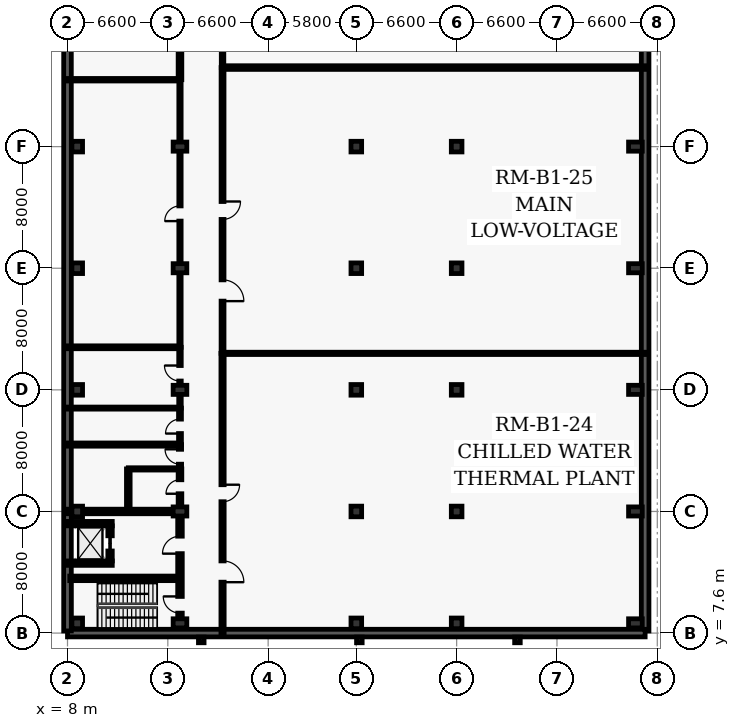
"""IFC4 building model, lengths in metres.
Left out: names, types, materials, properties, quantities, classifications, styles, units other than length and angle.
Written with IfcOpenShell. Run it as: python <this file> out.ifc"""

import sys

from ifc_helpers import new_model, si_unit, direction, frame, frame_2d, origin, origin_2d, place, context, subcontext, project, spatial, rectangle, i_section, extrude, element, fill, save


model = new_model("IFC4")
c1 = context("Model", 3, precision=1e-05, world=origin(), true_north=direction((0.0, 1.0)))
c2 = subcontext(c1, "Body", "Model", "MODEL_VIEW")
j1 = project(units=[si_unit("LENGTHUNIT", "METRE"), si_unit("PLANEANGLEUNIT", "RADIAN")], contexts=[c1])
p1 = place(None, origin())
s1 = spatial("IfcSite", under=j1, at=p1, CompositionType="ELEMENT")
p2 = place(p1, origin())
s2 = spatial("IfcBuilding", under=s1, at=p2, CompositionType="ELEMENT")
p3 = place(p2, frame((0.0, 0.0, -4.8)))
s3 = spatial("IfcBuildingStorey", under=s2, at=p3, CompositionType="ELEMENT", Elevation=-4.8)
for number, where, z_axis, x_axis in (
    (1, (8.64, 8.24, 0.0), (0.0, 0.0, 1.0), (1.0, 0.0, 0.0)),
    (2, (8.64, 15.6, 0.0), (0.0, 0.0, 1.0), (1.0, 0.0, 0.0)),
    (3, (8.64, 23.6, 0.0), (0.0, 0.0, 1.0), (1.0, 0.0, 0.0)),
    (4, (8.64, 31.6, 0.0), (0.0, 0.0, 1.0), (1.0, 0.0, 0.0)),
    (5, (8.64, 39.6, 0.0), (0.0, 0.0, 1.0), (1.0, 0.0, 0.0)),
):
    element("IfcColumn", number, at=place(p3, frame(where, z_axis=z_axis, x_axis=x_axis)), inside=s3, PredefinedType="COLUMN", context=c2, shape_type="SweptSolid", body=[
        extrude(rectangle(XDim=0.7, YDim=0.7, at=origin_2d()), origin(), (0.0, 0.0, 1.0), 4.8),
    ])
for number, where, z_axis, x_axis in (
    (6, (15.4, 8.24, 0.0), (0.0, 0.0, 1.0), (1.0, 0.0, 0.0)),
    (7, (15.4, 15.6, 0.0), (0.0, 0.0, 1.0), (1.0, 0.0, 0.0)),
    (8, (15.4, 23.6, 0.0), (0.0, 0.0, 1.0), (1.0, 0.0, 0.0)),
    (9, (15.4, 31.6, 0.0), (0.0, 0.0, 1.0), (1.0, 0.0, 0.0)),
    (10, (15.4, 39.6, 0.0), (0.0, 0.0, 1.0), (1.0, 0.0, 0.0)),
):
    element("IfcColumn", number, at=place(p3, frame(where, z_axis=z_axis, x_axis=x_axis)), inside=s3, PredefinedType="COLUMN", context=c2, shape_type="SweptSolid", body=[
        extrude(rectangle(XDim=0.6, YDim=0.9, at=origin_2d()), origin(), (0.0, 0.0, 1.0), 4.8),
    ])
for number, where, z_axis, x_axis in (
    (11, (27.0, 8.24, 0.0), (0.0, 0.0, 1.0), (1.0, 0.0, 0.0)),
    (12, (27.0, 15.6, 0.0), (0.0, 0.0, 1.0), (1.0, 0.0, 0.0)),
    (13, (27.0, 23.6, 0.0), (0.0, 0.0, 1.0), (1.0, 0.0, 0.0)),
    (14, (27.0, 31.6, 0.0), (0.0, 0.0, 1.0), (1.0, 0.0, 0.0)),
    (15, (27.0, 39.6, 0.0), (0.0, 0.0, 1.0), (1.0, 0.0, 0.0)),
    (16, (33.6, 8.24, 0.0), (0.0, 0.0, 1.0), (1.0, 0.0, 0.0)),
    (17, (33.6, 15.6, 0.0), (0.0, 0.0, 1.0), (1.0, 0.0, 0.0)),
    (18, (33.6, 23.6, 0.0), (0.0, 0.0, 1.0), (1.0, 0.0, 0.0)),
    (19, (33.6, 31.6, 0.0), (0.0, 0.0, 1.0), (1.0, 0.0, 0.0)),
    (20, (33.6, 39.6, 0.0), (0.0, 0.0, 1.0), (1.0, 0.0, 0.0)),
):
    element("IfcColumn", number, at=place(p3, frame(where, z_axis=z_axis, x_axis=x_axis)), inside=s3, PredefinedType="COLUMN", context=c2, shape_type="SweptSolid", body=[
        extrude(rectangle(XDim=0.7, YDim=0.7, at=origin_2d()), origin(), (0.0, 0.0, 1.0), 4.8),
    ])
for number, where, z_axis, x_axis in (
    (21, (45.36, 8.24, 0.0), (0.0, 0.0, 1.0), (1.0, 0.0, 0.0)),
    (22, (45.36, 15.6, 0.0), (0.0, 0.0, 1.0), (1.0, 0.0, 0.0)),
    (23, (45.36, 23.6, 0.0), (0.0, 0.0, 1.0), (1.0, 0.0, 0.0)),
    (24, (45.36, 31.6, 0.0), (0.0, 0.0, 1.0), (1.0, 0.0, 0.0)),
    (25, (45.36, 39.6, 0.0), (0.0, 0.0, 1.0), (1.0, 0.0, 0.0)),
):
    element("IfcColumn", number, at=place(p3, frame(where, z_axis=z_axis, x_axis=x_axis)), inside=s3, PredefinedType="COLUMN", context=c2, shape_type="SweptSolid", body=[
        extrude(rectangle(XDim=0.6, YDim=0.9, at=origin_2d()), origin(), (0.0, 0.0, 1.0), 4.8),
    ])
for number, where, z_axis, x_axis in (
    (26, (16.8, 7.15, -0.45), (0.0, 0.0, 1.0), (1.0, 0.0, 0.0)),
    (27, (27.2, 7.15, -0.45), (0.0, 0.0, 1.0), (1.0, 0.0, 0.0)),
    (28, (37.6, 7.15, -0.45), (0.0, 0.0, 1.0), (1.0, 0.0, 0.0)),
):
    element("IfcColumn", number, at=place(p3, frame(where, z_axis=z_axis, x_axis=x_axis)), inside=s3, PredefinedType="COLUMN", context=c2, shape_type="SweptSolid", body=[
        extrude(i_section(OverallWidth=0.373, OverallDepth=0.368, WebThickness=0.014, FlangeThickness=0.024, at=origin_2d()), origin(), (0.0, 0.0, 1.0), 5.25),
    ])
p4 = place(p3, frame((46.0, 63.46, 0.0), z_axis=(0.0, 0.0, 1.0), x_axis=(0.0, -1.0, 0.0)))
e29 = element("IfcWall", 29, at=p4, inside=s3, PredefinedType="USERDEFINED", context=c2, shape_type="SweptSolid", body=[
    extrude(rectangle(XDim=55.72, YDim=0.5, at=frame_2d((27.86, 0.0))), origin(), (0.0, 0.0, 1.0), 4.5),
])
p5 = place(p3, frame((46.0, 7.6, 0.0), z_axis=(0.0, 0.0, 1.0), x_axis=(-1.0, 0.0, 0.0)))
e30 = element("IfcWall", 30, at=p5, inside=s3, PredefinedType="USERDEFINED", context=c2, shape_type="SweptSolid", body=[
    extrude(rectangle(XDim=38.0, YDim=0.5, at=frame_2d((19.0, 0.0))), origin(), (0.0, 0.0, 1.0), 4.5),
])
p6 = place(p3, frame((8.0, 7.74, 0.0), z_axis=(0.0, 0.0, 1.0), x_axis=(0.0, 1.0, 0.0)))
e31 = element("IfcWall", 31, at=p6, inside=s3, PredefinedType="USERDEFINED", context=c2, shape_type="SweptSolid", body=[
    extrude(rectangle(XDim=55.72, YDim=0.5, at=frame_2d((27.86, 0.0))), origin(), (0.0, 0.0, 1.0), 4.5),
])
p7 = place(p3, frame((7.85, 15.6, 0.0), z_axis=(0.0, 0.0, 1.0), x_axis=(1.0, 0.0, 0.0)))
e32 = element("IfcWall", 32, at=p7, inside=s3, PredefinedType="SHEAR", context=c2, shape_type="SweptSolid", body=[
    extrude(rectangle(XDim=7.248, YDim=0.3, at=frame_2d((3.624, 0.0))), origin(), (0.0, 0.0, 1.0), 4.5),
])
p8 = place(p3, frame((15.4, 8.692, 0.0), z_axis=(0.0, 0.0, 1.0), x_axis=(0.0, 1.0, 0.0)))
e33 = element("IfcWall", 33, at=p8, inside=s3, PredefinedType="SHEAR", context=c2, shape_type="SweptSolid", body=[
    extrude(rectangle(XDim=6.456, YDim=0.3, at=frame_2d((3.228, 0.0))), origin(), (0.0, 0.0, 1.0), 4.5),
])
p9 = place(p8, frame((0.22, 0.0, 0.0)))
e34 = element("IfcOpeningElement", 34, at=p9, cuts=e33, PredefinedType="OPENING", context=c2, shape_type="SweptSolid", body=[
    extrude(rectangle(XDim=1.1, YDim=2.15, at=frame_2d((0.55, 1.075))), frame((0.0, 0.16, 0.0), z_axis=(0.0, -1.0, 0.0), x_axis=(1.0, 0.0, 0.0)), (0.0, 0.0, 1.0), 0.32),
])
p10 = place(p8, frame((4.133, 0.0, 0.0)))
e35 = element("IfcOpeningElement", 35, at=p10, cuts=e33, PredefinedType="OPENING", context=c2, shape_type="SweptSolid", body=[
    extrude(rectangle(XDim=1.15, YDim=2.2, at=frame_2d((0.575, 1.1))), frame((0.0, 0.16, 0.0), z_axis=(0.0, -1.0, 0.0), x_axis=(1.0, 0.0, 0.0)), (0.0, 0.0, 1.0), 0.32),
])
p11 = place(p3, frame((8.15, 11.2, 0.0), z_axis=(0.0, 0.0, 1.0), x_axis=(1.0, 0.0, 0.0)))
e36 = element("IfcWall", 36, at=p11, inside=s3, PredefinedType="SHEAR", context=c2, shape_type="SweptSolid", body=[
    extrude(rectangle(XDim=7.1, YDim=0.3, at=frame_2d((3.55, 0.0))), origin(), (0.0, 0.0, 1.0), 4.5),
])
for number, where, z_axis, x_axis in (
    (37, (8.055, 12.2, 0.0), (0.0, 0.0, 1.0), (1.0, 0.0, 0.0)),
    (38, (8.055, 14.8, 0.0), (0.0, 0.0, 1.0), (1.0, 0.0, 0.0)),
):
    element("IfcWall", number, at=place(p3, frame(where, z_axis=z_axis, x_axis=x_axis)), inside=s3, PredefinedType="SHEAR", context=c2, shape_type="SweptSolid", body=[
        extrude(rectangle(XDim=2.89, YDim=0.29, at=frame_2d((1.445, 0.0))), origin(), (0.0, 0.0, 1.0), 4.5),
    ])
p12 = place(p3, frame((10.8, 12.345, 0.0), z_axis=(0.0, 0.0, 1.0), x_axis=(0.0, 1.0, 0.0)))
e39 = element("IfcWall", 39, at=p12, inside=s3, PredefinedType="SHEAR", context=c2, shape_type="SweptSolid", body=[
    extrude(rectangle(XDim=2.31, YDim=0.29, at=frame_2d((1.155, 0.0))), origin(), (0.0, 0.0, 1.0), 4.5),
])
p13 = place(p12, frame((0.655, 0.0, 0.0)))
e40 = element("IfcOpeningElement", 40, at=p13, cuts=e39, PredefinedType="OPENING", context=c2, shape_type="SweptSolid", body=[
    extrude(rectangle(XDim=1.0, YDim=2.15, at=frame_2d((0.5, 1.075))), frame((0.0, 0.155, 0.0), z_axis=(0.0, -1.0, 0.0), x_axis=(1.0, 0.0, 0.0)), (0.0, 0.0, 1.0), 0.31),
])
p14 = place(p3, frame((15.4, 16.052, 0.0), z_axis=(0.0, 0.0, 1.0), x_axis=(0.0, 1.0, 0.0)))
e41 = element("IfcWall", 41, at=p14, inside=s3, PredefinedType="PARTITIONING", context=c2, shape_type="SweptSolid", body=[
    extrude(rectangle(XDim=2.348, YDim=0.24, at=frame_2d((1.174, 0.0))), origin(), (0.0, 0.0, 1.0), 3.65),
])
p15 = place(p14, frame((0.714, 0.0, 0.0)))
e42 = element("IfcOpeningElement", 42, at=p15, cuts=e41, PredefinedType="OPENING", context=c2, shape_type="SweptSolid", body=[
    extrude(rectangle(XDim=0.92, YDim=2.1, at=frame_2d((0.46, 1.05))), frame((0.0, 0.13, 0.0), z_axis=(0.0, -1.0, 0.0), x_axis=(1.0, 0.0, 0.0)), (0.0, 0.0, 1.0), 0.26),
])
p16 = place(p3, frame((15.4, 18.4, 0.0), z_axis=(0.0, 0.0, 1.0), x_axis=(0.0, 1.0, 0.0)))
e43 = element("IfcWall", 43, at=p16, inside=s3, PredefinedType="PARTITIONING", context=c2, shape_type="SweptSolid", body=[
    extrude(rectangle(XDim=1.6, YDim=0.21, at=frame_2d((0.8, 0.0))), origin(), (0.0, 0.0, 1.0), 3.65),
])
p17 = place(p16, frame((0.31, 0.0, 0.0)))
e44 = element("IfcOpeningElement", 44, at=p17, cuts=e43, PredefinedType="OPENING", context=c2, shape_type="SweptSolid", body=[
    extrude(rectangle(XDim=0.98, YDim=2.1, at=frame_2d((0.49, 1.05))), frame((0.0, 0.115, 0.0), z_axis=(0.0, -1.0, 0.0), x_axis=(1.0, 0.0, 0.0)), (0.0, 0.0, 1.0), 0.23),
])
p18 = place(p3, frame((15.4, 20.0, 0.0), z_axis=(0.0, 0.0, 1.0), x_axis=(0.0, 1.0, 0.0)))
e45 = element("IfcWall", 45, at=p18, inside=s3, PredefinedType="PARTITIONING", context=c2, shape_type="SweptSolid", body=[
    extrude(rectangle(XDim=2.4, YDim=0.19, at=frame_2d((1.2, 0.0))), origin(), (0.0, 0.0, 1.0), 3.65),
])
p19 = place(p18, frame((0.725, 0.0, 0.0)))
e46 = element("IfcOpeningElement", 46, at=p19, cuts=e45, PredefinedType="OPENING", context=c2, shape_type="SweptSolid", body=[
    extrude(rectangle(XDim=0.95, YDim=2.1, at=frame_2d((0.475, 1.05))), frame((0.0, 0.105, 0.0), z_axis=(0.0, -1.0, 0.0), x_axis=(1.0, 0.0, 0.0)), (0.0, 0.0, 1.0), 0.21),
])
p20 = place(p3, frame((15.4, 22.4, 0.0), z_axis=(0.0, 0.0, 1.0), x_axis=(0.0, 1.0, 0.0)))
e47 = element("IfcWall", 47, at=p20, inside=s3, PredefinedType="PARTITIONING", context=c2, shape_type="SweptSolid", body=[
    extrude(rectangle(XDim=4.0, YDim=0.165, at=frame_2d((2.0, 0.0))), origin(), (0.0, 0.0, 1.0), 3.65),
])
p21 = place(p20, frame((1.78, 0.0, 0.0)))
e48 = element("IfcOpeningElement", 48, at=p21, cuts=e47, PredefinedType="OPENING", context=c2, shape_type="SweptSolid", body=[
    extrude(rectangle(XDim=1.02, YDim=2.1, at=frame_2d((0.51, 1.05))), frame((0.0, 0.093, 0.0), z_axis=(0.0, -1.0, 0.0), x_axis=(1.0, 0.0, 0.0)), (0.0, 0.0, 1.0), 0.185),
])
p22 = place(p3, frame((15.4, 26.4, 0.0), z_axis=(0.0, 0.0, 1.0), x_axis=(0.0, 1.0, 0.0)))
e49 = element("IfcWall", 49, at=p22, inside=s3, PredefinedType="PARTITIONING", context=c2, shape_type="SweptSolid", body=[
    extrude(rectangle(XDim=17.6, YDim=0.15, at=frame_2d((8.8, 0.0))), origin(), (0.0, 0.0, 1.0), 3.65),
])
p23 = place(p22, frame((8.3, 0.0, 0.0)))
e50 = element("IfcOpeningElement", 50, at=p23, cuts=e49, PredefinedType="OPENING", context=c2, shape_type="SweptSolid", body=[
    extrude(rectangle(XDim=1.0, YDim=2.1, at=frame_2d((0.5, 1.05))), frame((0.0, 0.085, 0.0), z_axis=(0.0, -1.0, 0.0), x_axis=(1.0, 0.0, 0.0)), (0.0, 0.0, 1.0), 0.17),
])
p24 = place(p3, frame((15.4, 44.0, 0.0), z_axis=(0.0, 0.0, 1.0), x_axis=(0.0, 1.0, 0.0)))
e51 = element("IfcWall", 51, at=p24, inside=s3, PredefinedType="PARTITIONING", context=c2, shape_type="SweptSolid", body=[
    extrude(rectangle(XDim=19.6, YDim=0.24, at=frame_2d((9.8, 0.0))), origin(), (0.0, 0.0, 1.0), 3.65),
])
p25 = place(p24, frame((9.26, 0.0, 0.0)))
e52 = element("IfcOpeningElement", 52, at=p25, cuts=e51, PredefinedType="OPENING", context=c2, shape_type="SweptSolid", body=[
    extrude(rectangle(XDim=1.08, YDim=2.15, at=frame_2d((0.54, 1.075))), frame((0.0, 0.13, 0.0), z_axis=(0.0, -1.0, 0.0), x_axis=(1.0, 0.0, 0.0)), (0.0, 0.0, 1.0), 0.26),
])
p26 = place(p3, frame((18.2, 26.0, 0.0), z_axis=(0.0, 0.0, 1.0), x_axis=(0.0, -1.0, 0.0)))
e53 = element("IfcWall", 53, at=p26, inside=s3, PredefinedType="PARTITIONING", context=c2, shape_type="SweptSolid", body=[
    extrude(rectangle(XDim=18.4, YDim=0.21, at=frame_2d((9.2, 0.0))), origin(), (0.0, 0.0, 1.0), 4.5),
])
p27 = place(p26, frame((8.64, 0.0, 0.0)))
e54 = element("IfcOpeningElement", 54, at=p27, cuts=e53, PredefinedType="OPENING", context=c2, shape_type="SweptSolid", body=[
    extrude(rectangle(XDim=1.12, YDim=2.15, at=frame_2d((0.56, 1.075))), frame((0.0, 0.115, 0.0), z_axis=(0.0, -1.0, 0.0), x_axis=(1.0, 0.0, 0.0)), (0.0, 0.0, 1.0), 0.23),
])
p28 = place(p26, frame((13.652, 0.0, 0.0)))
e55 = element("IfcOpeningElement", 55, at=p28, cuts=e53, PredefinedType="OPENING", context=c2, shape_type="SweptSolid", body=[
    extrude(rectangle(XDim=1.4, YDim=2.25, at=frame_2d((0.7, 1.125))), frame((0.0, 0.115, 0.0), z_axis=(0.0, -1.0, 0.0), x_axis=(1.0, 0.0, 0.0)), (0.0, 0.0, 1.0), 0.23),
])
p29 = place(p3, frame((18.2, 44.8, 0.0), z_axis=(0.0, 0.0, 1.0), x_axis=(0.0, -1.0, 0.0)))
e56 = element("IfcWall", 56, at=p29, inside=s3, PredefinedType="PARTITIONING", context=c2, shape_type="SweptSolid", body=[
    extrude(rectangle(XDim=18.8, YDim=0.19, at=frame_2d((9.4, 0.0))), origin(), (0.0, 0.0, 1.0), 4.5),
])
p30 = place(p29, frame((8.81, 0.0, 0.0)))
e57 = element("IfcOpeningElement", 57, at=p30, cuts=e56, PredefinedType="OPENING", context=c2, shape_type="SweptSolid", body=[
    extrude(rectangle(XDim=1.18, YDim=2.15, at=frame_2d((0.59, 1.075))), frame((0.0, 0.105, 0.0), z_axis=(0.0, -1.0, 0.0), x_axis=(1.0, 0.0, 0.0)), (0.0, 0.0, 1.0), 0.21),
])
p31 = place(p29, frame((13.964, 0.0, 0.0)))
e58 = element("IfcOpeningElement", 58, at=p31, cuts=e56, PredefinedType="OPENING", context=c2, shape_type="SweptSolid", body=[
    extrude(rectangle(XDim=1.4, YDim=2.25, at=frame_2d((0.7, 1.125))), frame((0.0, 0.105, 0.0), z_axis=(0.0, -1.0, 0.0), x_axis=(1.0, 0.0, 0.0)), (0.0, 0.0, 1.0), 0.21),
])
p32 = place(p3, frame((18.2, 63.6, 0.0), z_axis=(0.0, 0.0, 1.0), x_axis=(0.0, -1.0, 0.0)))
e59 = element("IfcWall", 59, at=p32, inside=s3, PredefinedType="PARTITIONING", context=c2, shape_type="SweptSolid", body=[
    extrude(rectangle(XDim=18.8, YDim=0.165, at=frame_2d((9.4, 0.0))), origin(), (0.0, 0.0, 1.0), 4.5),
])
p33 = place(p32, frame((8.79, 0.0, 0.0)))
e60 = element("IfcOpeningElement", 60, at=p33, cuts=e59, PredefinedType="OPENING", context=c2, shape_type="SweptSolid", body=[
    extrude(rectangle(XDim=1.22, YDim=2.2, at=frame_2d((0.61, 1.1))), frame((0.0, 0.093, 0.0), z_axis=(0.0, -1.0, 0.0), x_axis=(1.0, 0.0, 0.0)), (0.0, 0.0, 1.0), 0.185),
])
p34 = place(p32, frame((14.054, 0.0, 0.0)))
e61 = element("IfcOpeningElement", 61, at=p34, cuts=e59, PredefinedType="OPENING", context=c2, shape_type="SweptSolid", body=[
    extrude(rectangle(XDim=1.22, YDim=2.2, at=frame_2d((0.61, 1.1))), frame((0.0, 0.093, 0.0), z_axis=(0.0, -1.0, 0.0), x_axis=(1.0, 0.0, 0.0)), (0.0, 0.0, 1.0), 0.185),
])
p35 = place(p3, frame((12.0, 18.4, 0.0), z_axis=(0.0, 0.0, 1.0), x_axis=(1.0, 0.0, 0.0)))
e62 = element("IfcWall", 62, at=p35, inside=s3, PredefinedType="PARTITIONING", context=c2, shape_type="SweptSolid", body=[
    extrude(rectangle(XDim=3.4, YDim=0.15, at=frame_2d((1.7, 0.0))), origin(), (0.0, 0.0, 1.0), 4.5),
])
p36 = place(p3, frame((12.0, 15.6, 0.0), z_axis=(0.0, 0.0, 1.0), x_axis=(0.0, 1.0, 0.0)))
e63 = element("IfcWall", 63, at=p36, inside=s3, PredefinedType="PARTITIONING", context=c2, shape_type="SweptSolid", body=[
    extrude(rectangle(XDim=2.8, YDim=0.24, at=frame_2d((1.4, 0.0))), origin(), (0.0, 0.0, 1.0), 4.5),
])
p37 = place(p3, frame((8.0, 20.0, 0.0), z_axis=(0.0, 0.0, 1.0), x_axis=(1.0, 0.0, 0.0)))
e64 = element("IfcWall", 64, at=p37, inside=s3, PredefinedType="PARTITIONING", context=c2, shape_type="SweptSolid", body=[
    extrude(rectangle(XDim=7.4, YDim=0.21, at=frame_2d((3.7, 0.0))), origin(), (0.0, 0.0, 1.0), 4.5),
])
p38 = place(p3, frame((8.0, 22.4, 0.0), z_axis=(0.0, 0.0, 1.0), x_axis=(1.0, 0.0, 0.0)))
e65 = element("IfcWall", 65, at=p38, inside=s3, PredefinedType="PARTITIONING", context=c2, shape_type="SweptSolid", body=[
    extrude(rectangle(XDim=7.4, YDim=0.135, at=frame_2d((3.7, 0.0))), origin(), (0.0, 0.0, 1.0), 4.5),
])
p39 = place(p3, frame((8.0, 26.4, 0.0), z_axis=(0.0, 0.0, 1.0), x_axis=(1.0, 0.0, 0.0)))
e66 = element("IfcWall", 66, at=p39, inside=s3, PredefinedType="PARTITIONING", context=c2, shape_type="SweptSolid", body=[
    extrude(rectangle(XDim=7.4, YDim=0.19, at=frame_2d((3.7, 0.0))), origin(), (0.0, 0.0, 1.0), 4.5),
])
p40 = place(p3, frame((8.0, 44.0, 0.0), z_axis=(0.0, 0.0, 1.0), x_axis=(1.0, 0.0, 0.0)))
e67 = element("IfcWall", 67, at=p40, inside=s3, PredefinedType="PARTITIONING", context=c2, shape_type="SweptSolid", body=[
    extrude(rectangle(XDim=7.4, YDim=0.165, at=frame_2d((3.7, 0.0))), origin(), (0.0, 0.0, 1.0), 4.5),
])
p41 = place(p3, frame((18.2, 26.0, 0.0), z_axis=(0.0, 0.0, 1.0), x_axis=(1.0, 0.0, 0.0)))
e68 = element("IfcWall", 68, at=p41, inside=s3, PredefinedType="PARTITIONING", context=c2, shape_type="SweptSolid", body=[
    extrude(rectangle(XDim=27.8, YDim=0.15, at=frame_2d((13.9, 0.0))), origin(), (0.0, 0.0, 1.0), 4.5),
])
p42 = place(p3, frame((18.2, 44.8, 0.0), z_axis=(0.0, 0.0, 1.0), x_axis=(1.0, 0.0, 0.0)))
e69 = element("IfcWall", 69, at=p42, inside=s3, PredefinedType="PARTITIONING", context=c2, shape_type="SweptSolid", body=[
    extrude(rectangle(XDim=27.8, YDim=0.24, at=frame_2d((13.9, 0.0))), origin(), (0.0, 0.0, 1.0), 4.5),
])
p43 = place(p9, origin())
e70 = element("IfcDoor", 70, at=p43, inside=s3, OperationType="SINGLE_SWING_RIGHT", PredefinedType="DOOR", context=c2, shape_type="SweptSolid", body=[
    extrude(rectangle(XDim=1.1, YDim=2.15, at=frame_2d((0.55, 1.075))), frame((0.0, 0.025, 0.0), z_axis=(0.0, -1.0, 0.0), x_axis=(1.0, 0.0, 0.0)), (0.0, 0.0, 1.0), 0.05),
])
fill(e34, e70)
p44 = place(p10, origin())
e71 = element("IfcDoor", 71, at=p44, inside=s3, OperationType="SINGLE_SWING_LEFT", PredefinedType="DOOR", context=c2, shape_type="SweptSolid", body=[
    extrude(rectangle(XDim=1.15, YDim=2.2, at=frame_2d((0.575, 1.1))), frame((0.0, 0.025, 0.0), z_axis=(0.0, -1.0, 0.0), x_axis=(1.0, 0.0, 0.0)), (0.0, 0.0, 1.0), 0.05),
])
fill(e35, e71)
p45 = place(p13, origin())
e72 = element("IfcDoor", 72, at=p45, inside=s3, OperationType="SLIDING_TO_LEFT", PredefinedType="DOOR", context=c2, shape_type="SweptSolid", body=[
    extrude(rectangle(XDim=1.0, YDim=2.15, at=frame_2d((0.5, 1.075))), frame((0.0, 0.025, 0.0), z_axis=(0.0, -1.0, 0.0), x_axis=(1.0, 0.0, 0.0)), (0.0, 0.0, 1.0), 0.05),
])
fill(e40, e72)
p46 = place(p15, origin())
e73 = element("IfcDoor", 73, at=p46, inside=s3, OperationType="SINGLE_SWING_LEFT", PredefinedType="DOOR", context=c2, shape_type="SweptSolid", body=[
    extrude(rectangle(XDim=0.92, YDim=2.1, at=frame_2d((0.46, 1.05))), frame((0.0, 0.025, 0.0), z_axis=(0.0, -1.0, 0.0), x_axis=(1.0, 0.0, 0.0)), (0.0, 0.0, 1.0), 0.05),
])
fill(e42, e73)
p47 = place(p17, origin())
e74 = element("IfcDoor", 74, at=p47, inside=s3, OperationType="SINGLE_SWING_RIGHT", PredefinedType="DOOR", context=c2, shape_type="SweptSolid", body=[
    extrude(rectangle(XDim=0.98, YDim=2.1, at=frame_2d((0.49, 1.05))), frame((0.0, 0.025, 0.0), z_axis=(0.0, -1.0, 0.0), x_axis=(1.0, 0.0, 0.0)), (0.0, 0.0, 1.0), 0.05),
])
fill(e44, e74)
p48 = place(p19, origin())
e75 = element("IfcDoor", 75, at=p48, inside=s3, OperationType="SINGLE_SWING_LEFT", PredefinedType="DOOR", context=c2, shape_type="SweptSolid", body=[
    extrude(rectangle(XDim=0.95, YDim=2.1, at=frame_2d((0.475, 1.05))), frame((0.0, 0.025, 0.0), z_axis=(0.0, -1.0, 0.0), x_axis=(1.0, 0.0, 0.0)), (0.0, 0.0, 1.0), 0.05),
])
fill(e46, e75)
p49 = place(p21, origin())
e76 = element("IfcDoor", 76, at=p49, inside=s3, OperationType="SINGLE_SWING_RIGHT", PredefinedType="DOOR", context=c2, shape_type="SweptSolid", body=[
    extrude(rectangle(XDim=1.02, YDim=2.1, at=frame_2d((0.51, 1.05))), frame((0.0, 0.025, 0.0), z_axis=(0.0, -1.0, 0.0), x_axis=(1.0, 0.0, 0.0)), (0.0, 0.0, 1.0), 0.05),
])
fill(e48, e76)
p50 = place(p23, origin())
e77 = element("IfcDoor", 77, at=p50, inside=s3, OperationType="SINGLE_SWING_LEFT", PredefinedType="DOOR", context=c2, shape_type="SweptSolid", body=[
    extrude(rectangle(XDim=1.0, YDim=2.1, at=frame_2d((0.5, 1.05))), frame((0.0, 0.025, 0.0), z_axis=(0.0, -1.0, 0.0), x_axis=(1.0, 0.0, 0.0)), (0.0, 0.0, 1.0), 0.05),
])
fill(e50, e77)
p51 = place(p27, origin())
e78 = element("IfcDoor", 78, at=p51, inside=s3, OperationType="SINGLE_SWING_LEFT", PredefinedType="DOOR", context=c2, shape_type="SweptSolid", body=[
    extrude(rectangle(XDim=1.12, YDim=2.15, at=frame_2d((0.56, 1.075))), frame((0.0, 0.025, 0.0), z_axis=(0.0, -1.0, 0.0), x_axis=(1.0, 0.0, 0.0)), (0.0, 0.0, 1.0), 0.05),
])
fill(e54, e78)
p52 = place(p28, origin())
e79 = element("IfcDoor", 79, at=p52, inside=s3, OperationType="SINGLE_SWING_RIGHT", PredefinedType="DOOR", context=c2, shape_type="SweptSolid", body=[
    extrude(rectangle(XDim=1.4, YDim=2.25, at=frame_2d((0.7, 1.125))), frame((0.0, 0.025, 0.0), z_axis=(0.0, -1.0, 0.0), x_axis=(1.0, 0.0, 0.0)), (0.0, 0.0, 1.0), 0.05),
])
fill(e55, e79)
p53 = place(p30, origin())
e80 = element("IfcDoor", 80, at=p53, inside=s3, OperationType="SINGLE_SWING_LEFT", PredefinedType="DOOR", context=c2, shape_type="SweptSolid", body=[
    extrude(rectangle(XDim=1.18, YDim=2.15, at=frame_2d((0.59, 1.075))), frame((0.0, 0.025, 0.0), z_axis=(0.0, -1.0, 0.0), x_axis=(1.0, 0.0, 0.0)), (0.0, 0.0, 1.0), 0.05),
])
fill(e57, e80)
p54 = place(p31, origin())
e81 = element("IfcDoor", 81, at=p54, inside=s3, OperationType="SINGLE_SWING_RIGHT", PredefinedType="DOOR", context=c2, shape_type="SweptSolid", body=[
    extrude(rectangle(XDim=1.4, YDim=2.25, at=frame_2d((0.7, 1.125))), frame((0.0, 0.025, 0.0), z_axis=(0.0, -1.0, 0.0), x_axis=(1.0, 0.0, 0.0)), (0.0, 0.0, 1.0), 0.05),
])
fill(e58, e81)
save(model, sys.argv[1])
